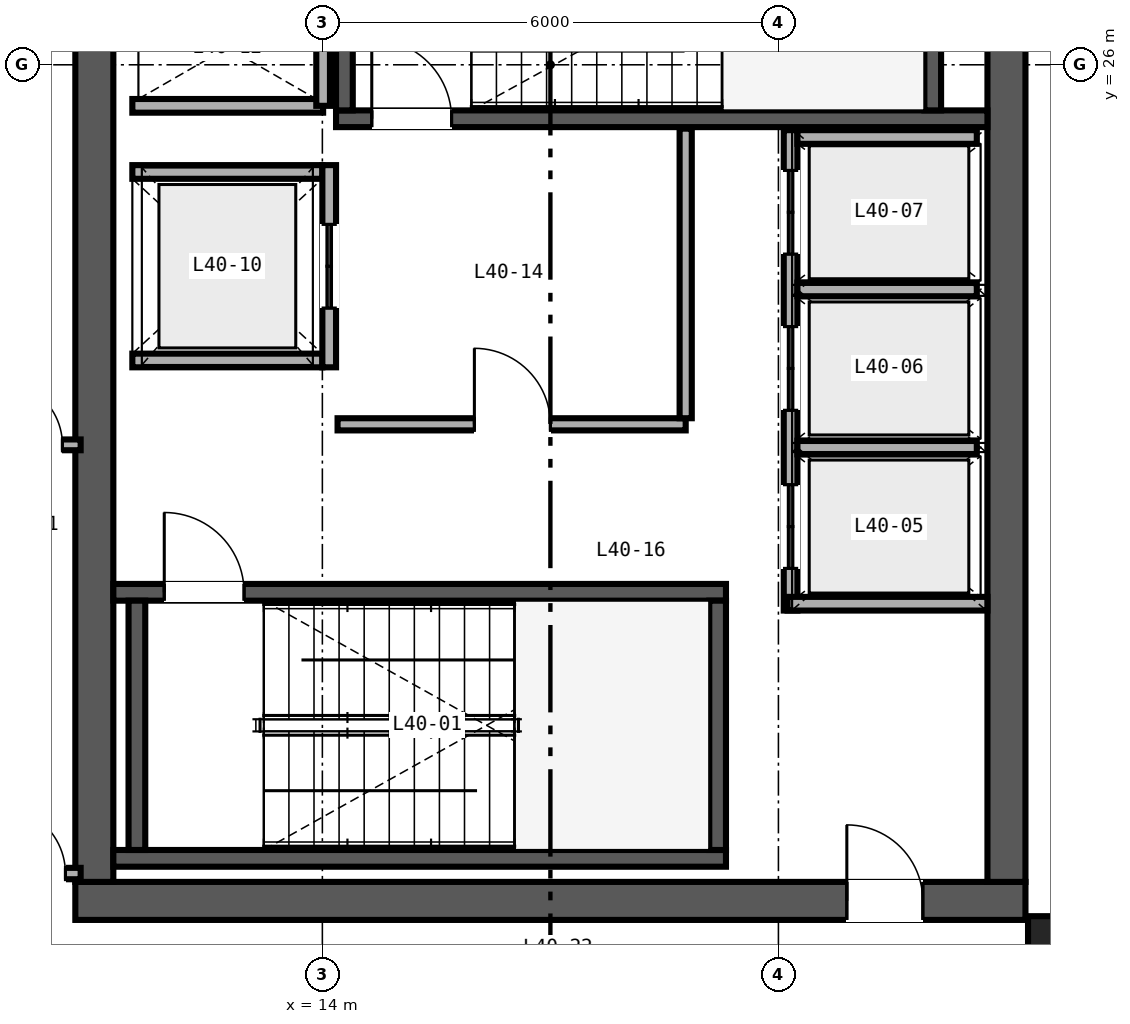
"""IFC4 building model, lengths in metres.
Left out: names, types, materials, properties, quantities, classifications, styles, units other than length and angle.
Written with IfcOpenShell. Run it as: python <this file> out.ifc"""

import sys

from ifc_helpers import new_model, si_unit, direction, frame, frame_2d, origin, origin_2d, place, context, subcontext, project, spatial, rectangle, i_section, extrude, source, transform, mapped, element, fill, save


model = new_model("IFC4")
c1 = context("Model", 3, precision=1e-05, world=origin(), true_north=direction((0.0, 1.0)))
c2 = subcontext(c1, "Body", "Model", "MODEL_VIEW")
j1 = project(units=[si_unit("LENGTHUNIT", "METRE"), si_unit("PLANEANGLEUNIT", "RADIAN")], contexts=[c1])
p1 = place(None, origin())
s1 = spatial("IfcSite", under=j1, at=p1, CompositionType="ELEMENT")
p2 = place(p1, origin())
s2 = spatial("IfcBuilding", under=s1, at=p2, CompositionType="ELEMENT")
p3 = place(p2, frame((0.0, 0.0, 163.2)))
s3 = spatial("IfcBuildingStorey", under=s2, at=p3, CompositionType="ELEMENT", Elevation=163.2)
p4 = place(p3, frame((10.75, 15.0, 0.0), z_axis=(0.0, 0.0, 1.0), x_axis=(1.0, 0.0, 0.0)))
e1 = element("IfcWall", 1, at=p4, inside=s3, PredefinedType="SHEAR", context=c2, shape_type="SweptSolid", body=[
    extrude(rectangle(XDim=12.5, YDim=0.5, at=frame_2d((6.25, 0.0))), origin(), (0.0, 0.0, 1.0), 3.37),
])
p5 = place(p4, frame((10.15, 0.0, 0.0)))
e2 = element("IfcOpeningElement", 2, at=p5, cuts=e1, PredefinedType="OPENING", context=c2, shape_type="SweptSolid", body=[
    extrude(rectangle(XDim=1.0, YDim=2.15, at=frame_2d((0.5, 1.075))), frame((0.0, 0.26, 0.0), z_axis=(0.0, -1.0, 0.0), x_axis=(1.0, 0.0, 0.0)), (0.0, 0.0, 1.0), 0.52),
])
for number, where, z_axis, x_axis in (
    (3, (11.0, 15.25, 0.0), (0.0, 0.0, 1.0), (0.0, 1.0, 0.0)),
    (4, (23.0, 15.25, 0.0), (0.0, 0.0, 1.0), (0.0, 1.0, 0.0)),
):
    element("IfcWall", number, at=place(p3, frame(where, z_axis=z_axis, x_axis=x_axis)), inside=s3, PredefinedType="SHEAR", context=c2, shape_type="SweptSolid", body=[
        extrude(rectangle(XDim=21.5, YDim=0.5, at=frame_2d((10.75, 0.0))), origin(), (0.0, 0.0, 1.0), 3.37),
    ])
p6 = place(p3, frame((11.25, 15.56, 0.0), z_axis=(0.0, 0.0, 1.0), x_axis=(1.0, 0.0, 0.0)))
e5 = element("IfcWall", 5, at=p6, inside=s3, PredefinedType="SHEAR", context=c2, shape_type="SweptSolid", body=[
    extrude(rectangle(XDim=8.06, YDim=0.22, at=frame_2d((4.03, 0.0))), origin(), (0.0, 0.0, 1.0), 3.4),
])
p7 = place(p3, frame((11.25, 19.06, 0.0), z_axis=(0.0, 0.0, 1.0), x_axis=(1.0, 0.0, 0.0)))
e6 = element("IfcWall", 6, at=p7, inside=s3, PredefinedType="SHEAR", context=c2, shape_type="SweptSolid", body=[
    extrude(rectangle(XDim=8.06, YDim=0.22, at=frame_2d((4.03, 0.0))), origin(), (0.0, 0.0, 1.0), 3.4),
])
p8 = place(p7, frame((0.67, 0.0, 0.0)))
e7 = element("IfcOpeningElement", 7, at=p8, cuts=e6, PredefinedType="OPENING", context=c2, shape_type="SweptSolid", body=[
    extrude(rectangle(XDim=1.05, YDim=2.15, at=frame_2d((0.525, 1.075))), frame((0.0, 0.12, 0.0), z_axis=(0.0, -1.0, 0.0), x_axis=(1.0, 0.0, 0.0)), (0.0, 0.0, 1.0), 0.24),
])
for number, where, z_axis, x_axis in (
    (8, (11.56, 15.67, 0.0), (0.0, 0.0, 1.0), (0.0, 1.0, 0.0)),
    (9, (19.2, 15.67, 0.0), (0.0, 0.0, 1.0), (0.0, 1.0, 0.0)),
):
    element("IfcWall", number, at=place(p3, frame(where, z_axis=z_axis, x_axis=x_axis)), inside=s3, PredefinedType="SHEAR", context=c2, shape_type="SweptSolid", body=[
        extrude(rectangle(XDim=3.28, YDim=0.22, at=frame_2d((1.64, 0.0))), origin(), (0.0, 0.0, 1.0), 3.4),
    ])
p9 = place(p3, frame((14.18, 25.29, 0.0), z_axis=(0.0, 0.0, 1.0), x_axis=(1.0, 0.0, 0.0)))
e10 = element("IfcWall", 10, at=p9, inside=s3, PredefinedType="SHEAR", context=c2, shape_type="SweptSolid", body=[
    extrude(rectangle(XDim=8.57, YDim=0.22, at=frame_2d((4.285, 0.0))), origin(), (0.0, 0.0, 1.0), 3.4),
])
p10 = place(p9, frame((0.47, 0.0, 0.0)))
e11 = element("IfcOpeningElement", 11, at=p10, cuts=e10, PredefinedType="OPENING", context=c2, shape_type="SweptSolid", body=[
    extrude(rectangle(XDim=1.05, YDim=2.15, at=frame_2d((0.525, 1.075))), frame((0.0, 0.12, 0.0), z_axis=(0.0, -1.0, 0.0), x_axis=(1.0, 0.0, 0.0)), (0.0, 0.0, 1.0), 0.24),
])
for number, where, z_axis, x_axis in (
    (12, (14.29, 25.4, 0.0), (0.0, 0.0, 1.0), (0.0, 1.0, 0.0)),
    (13, (22.03, 25.4, 0.0), (0.0, 0.0, 1.0), (0.0, 1.0, 0.0)),
):
    element("IfcWall", number, at=place(p3, frame(where, z_axis=z_axis, x_axis=x_axis)), inside=s3, PredefinedType="SHEAR", context=c2, shape_type="SweptSolid", body=[
        extrude(rectangle(XDim=3.28, YDim=0.22, at=frame_2d((1.64, 0.0))), origin(), (0.0, 0.0, 1.0), 3.4),
    ])
m1 = source(origin(), c2, "Body", "SweptSolid", [
    extrude(i_section(OverallWidth=0.432, OverallDepth=0.498, WebThickness=0.056, FlangeThickness=0.089, FilletRadius=0.025, at=origin_2d()), origin(), (0.0, 0.0, 1.0), 3.37),
])
p11 = place(p3, frame((23.5, 14.55, 0.0), z_axis=(0.0, 0.0, 1.0), x_axis=(1.0, 0.0, 0.0)))
e14 = element("IfcColumn", 14, at=p11, inside=s3, PredefinedType="COLUMN", context=c2, shape_type="MappedRepresentation", body=[
    mapped(m1, transform((0.0, 0.0, 0.0), scale=1.0)),
])
p12 = place(p3, frame((20.16, 18.82, 0.0), z_axis=(0.0, 0.0, 1.0), x_axis=(0.0, 1.0, 0.0)))
e15 = element("IfcWall", 15, at=p12, inside=s3, PredefinedType="SOLIDWALL", context=c2, shape_type="SweptSolid", body=[
    extrude(rectangle(XDim=6.32, YDim=0.18, at=frame_2d((3.16, 0.0))), origin(), (0.0, 0.0, 1.0), 2.47),
])
p13 = place(p12, frame((0.555, 0.0, 0.0)))
e16 = element("IfcOpeningElement", 16, at=p13, cuts=e15, PredefinedType="OPENING", context=c2, shape_type="SweptSolid", body=[
    extrude(rectangle(XDim=1.1, YDim=2.2, at=frame_2d((0.55, 1.1))), frame((0.0, 0.1, 0.0), z_axis=(0.0, -1.0, 0.0), x_axis=(1.0, 0.0, 0.0)), (0.0, 0.0, 1.0), 0.2),
])
p14 = place(p12, frame((2.635, 0.0, 0.0)))
e17 = element("IfcOpeningElement", 17, at=p14, cuts=e15, PredefinedType="OPENING", context=c2, shape_type="SweptSolid", body=[
    extrude(rectangle(XDim=1.1, YDim=2.2, at=frame_2d((0.55, 1.1))), frame((0.0, 0.1, 0.0), z_axis=(0.0, -1.0, 0.0), x_axis=(1.0, 0.0, 0.0)), (0.0, 0.0, 1.0), 0.2),
])
p15 = place(p12, frame((4.69, 0.0, 0.0)))
e18 = element("IfcOpeningElement", 18, at=p15, cuts=e15, PredefinedType="OPENING", context=c2, shape_type="SweptSolid", body=[
    extrude(rectangle(XDim=1.1, YDim=2.2, at=frame_2d((0.55, 1.1))), frame((0.0, 0.1, 0.0), z_axis=(0.0, -1.0, 0.0), x_axis=(1.0, 0.0, 0.0)), (0.0, 0.0, 1.0), 0.2),
])
p16 = place(p3, frame((20.12, 18.91, 0.0), z_axis=(0.0, 0.0, 1.0), x_axis=(1.0, 0.0, 0.0)))
e19 = element("IfcWall", 19, at=p16, inside=s3, PredefinedType="SOLIDWALL", context=c2, shape_type="SweptSolid", body=[
    extrude(rectangle(XDim=2.63, YDim=0.18, at=frame_2d((1.315, 0.0))), origin(), (0.0, 0.0, 1.0), 3.37),
])
p17 = place(p3, frame((20.25, 25.05, 0.0), z_axis=(0.0, 0.0, 1.0), x_axis=(1.0, 0.0, 0.0)))
e20 = element("IfcWall", 20, at=p17, inside=s3, PredefinedType="SOLIDWALL", context=c2, shape_type="SweptSolid", body=[
    extrude(rectangle(XDim=2.36, YDim=0.18, at=frame_2d((1.18, 0.0))), origin(), (0.0, 0.0, 1.0), 3.37),
])
p18 = place(p3, frame((20.25, 20.965, 0.0), z_axis=(0.0, 0.0, 1.0), x_axis=(1.0, 0.0, 0.0)))
e21 = element("IfcWall", 21, at=p18, inside=s3, PredefinedType="SOLIDWALL", context=c2, shape_type="SweptSolid", body=[
    extrude(rectangle(XDim=2.36, YDim=0.18, at=frame_2d((1.18, 0.0))), origin(), (0.0, 0.0, 1.0), 2.47),
])
p19 = place(p3, frame((20.25, 23.045, 0.0), z_axis=(0.0, 0.0, 1.0), x_axis=(1.0, 0.0, 0.0)))
e22 = element("IfcWall", 22, at=p19, inside=s3, PredefinedType="SOLIDWALL", context=c2, shape_type="SweptSolid", body=[
    extrude(rectangle(XDim=2.36, YDim=0.18, at=frame_2d((1.18, 0.0))), origin(), (0.0, 0.0, 1.0), 3.37),
])
for number, where, z_axis, x_axis in (
    (23, (11.5, 22.11, 0.0), (0.0, 0.0, 1.0), (1.0, 0.0, 0.0)),
    (24, (11.5, 24.59, 0.0), (0.0, 0.0, 1.0), (1.0, 0.0, 0.0)),
):
    element("IfcWall", number, at=place(p3, frame(where, z_axis=z_axis, x_axis=x_axis)), inside=s3, PredefinedType="SOLIDWALL", context=c2, shape_type="SweptSolid", body=[
        extrude(rectangle(XDim=2.5, YDim=0.18, at=frame_2d((1.25, 0.0))), origin(), (0.0, 0.0, 1.0), 3.37),
    ])
p20 = place(p3, frame((14.09, 22.02, 0.0), z_axis=(0.0, 0.0, 1.0), x_axis=(0.0, 1.0, 0.0)))
e25 = element("IfcWall", 25, at=p20, inside=s3, PredefinedType="SOLIDWALL", context=c2, shape_type="SweptSolid", body=[
    extrude(rectangle(XDim=2.66, YDim=0.18, at=frame_2d((1.33, 0.0))), origin(), (0.0, 0.0, 1.0), 3.37),
])
p21 = place(p20, frame((0.78, 0.0, 0.0)))
e26 = element("IfcOpeningElement", 26, at=p21, cuts=e25, PredefinedType="OPENING", context=c2, shape_type="SweptSolid", body=[
    extrude(rectangle(XDim=1.1, YDim=2.2, at=frame_2d((0.55, 1.1))), frame((0.0, 0.1, 0.0), z_axis=(0.0, -1.0, 0.0), x_axis=(1.0, 0.0, 0.0)), (0.0, 0.0, 1.0), 0.2),
])
p22 = place(p3, frame((11.5, 25.46, 0.0), z_axis=(0.0, 0.0, 1.0), x_axis=(1.0, 0.0, 0.0)))
e27 = element("IfcWall", 27, at=p22, inside=s3, PredefinedType="SOLIDWALL", context=c2, shape_type="SweptSolid", body=[
    extrude(rectangle(XDim=2.51, YDim=0.18, at=frame_2d((1.255, 0.0))), origin(), (0.0, 0.0, 1.0), 3.37),
])
p23 = place(p3, frame((14.01, 25.46, 0.0), z_axis=(0.0, 0.0, 1.0), x_axis=(0.0, 1.0, 0.0)))
e28 = element("IfcWall", 28, at=p23, inside=s3, PredefinedType="SOLIDWALL", context=c2, shape_type="SweptSolid", body=[
    extrude(rectangle(XDim=3.08, YDim=0.18, at=frame_2d((1.54, 0.0))), origin(), (0.0, 0.0, 1.0), 3.37),
])
p24 = place(p3, frame((14.2, 21.27, 0.0), z_axis=(0.0, 0.0, 1.0), x_axis=(1.0, 0.0, 0.0)))
e29 = element("IfcWall", 29, at=p24, inside=s3, PredefinedType="PARTITIONING", context=c2, shape_type="SweptSolid", body=[
    extrude(rectangle(XDim=4.58, YDim=0.16, at=frame_2d((2.29, 0.0))), origin(), (0.0, 0.0, 1.0), 3.37),
])
p25 = place(p24, frame((1.8, 0.0, 0.0)))
e30 = element("IfcOpeningElement", 30, at=p25, cuts=e29, PredefinedType="OPENING", context=c2, shape_type="SweptSolid", body=[
    extrude(rectangle(XDim=1.0, YDim=2.15, at=frame_2d((0.5, 1.075))), frame((0.0, 0.09, 0.0), z_axis=(0.0, -1.0, 0.0), x_axis=(1.0, 0.0, 0.0)), (0.0, 0.0, 1.0), 0.18),
])
p26 = place(p3, frame((18.78, 21.35, 0.0), z_axis=(0.0, 0.0, 1.0), x_axis=(0.0, 1.0, 0.0)))
e31 = element("IfcWall", 31, at=p26, inside=s3, PredefinedType="PARTITIONING", context=c2, shape_type="SweptSolid", body=[
    extrude(rectangle(XDim=3.81, YDim=0.16, at=frame_2d((1.905, 0.0))), origin(), (0.0, 0.0, 1.0), 3.37),
])
p27 = place(p3, frame((8.16, 15.36, 0.0), z_axis=(0.0, 0.0, 1.0), x_axis=(1.0, 0.0, 0.0)))
e32 = element("IfcWall", 32, at=p27, inside=s3, PredefinedType="PARTITIONING", context=c2, shape_type="SweptSolid", body=[
    extrude(rectangle(XDim=2.66, YDim=0.15, at=frame_2d((1.33, 0.0))), origin(), (0.0, 0.0, 1.0), 2.591),
])
p28 = place(p27, frame((1.58, 0.0, 0.0)))
e33 = element("IfcOpeningElement", 33, at=p28, cuts=e32, PredefinedType="OPENING", context=c2, shape_type="SweptSolid", body=[
    extrude(rectangle(XDim=0.88, YDim=2.15, at=frame_2d((0.44, 1.075))), frame((0.0, 0.085, 0.0), z_axis=(0.0, -1.0, 0.0), x_axis=(1.0, 0.0, 0.0)), (0.0, 0.0, 1.0), 0.17),
])
p29 = place(p3, frame((8.16, 21.0, 0.0), z_axis=(0.0, 0.0, 1.0), x_axis=(1.0, 0.0, 0.0)))
e34 = element("IfcWall", 34, at=p29, inside=s3, PredefinedType="PARTITIONING", context=c2, shape_type="SweptSolid", body=[
    extrude(rectangle(XDim=2.66, YDim=0.142, at=frame_2d((1.33, 0.0))), origin(), (0.0, 0.0, 1.0), 2.47),
])
p30 = place(p29, frame((1.58, 0.0, 0.0)))
e35 = element("IfcOpeningElement", 35, at=p30, cuts=e34, PredefinedType="OPENING", context=c2, shape_type="SweptSolid", body=[
    extrude(rectangle(XDim=0.84, YDim=2.1, at=frame_2d((0.42, 1.05))), frame((0.0, 0.081, 0.0), z_axis=(0.0, -1.0, 0.0), x_axis=(1.0, 0.0, 0.0)), (0.0, 0.0, 1.0), 0.162),
])
m2 = source(origin(), c2, "Body", "SweptSolid", [
    extrude(rectangle(XDim=1.05, YDim=2.15, at=frame_2d((0.525, 1.075))), frame((0.0, 0.025, 0.0), z_axis=(0.0, -1.0, 0.0), x_axis=(1.0, 0.0, 0.0)), (0.0, 0.0, 1.0), 0.05),
])
p31 = place(p8, origin())
e36 = element("IfcDoor", 36, at=p31, inside=s3, OperationType="SINGLE_SWING_LEFT", PredefinedType="DOOR", context=c2, shape_type="MappedRepresentation", body=[
    mapped(m2, transform((0.0, 0.0, 0.0), scale=1.0)),
])
fill(e7, e36)
p32 = place(p10, origin())
e37 = element("IfcDoor", 37, at=p32, inside=s3, OperationType="SINGLE_SWING_LEFT", PredefinedType="DOOR", context=c2, shape_type="MappedRepresentation", body=[
    mapped(m2, transform((0.0, 0.0, 0.0), scale=1.0)),
])
fill(e11, e37)
m3 = source(origin(), c2, "Body", "SweptSolid", [
    extrude(rectangle(XDim=1.1, YDim=2.2, at=frame_2d((0.55, 1.1))), frame((0.0, 0.025, 0.0), z_axis=(0.0, -1.0, 0.0), x_axis=(1.0, 0.0, 0.0)), (0.0, 0.0, 1.0), 0.05),
])
p33 = place(p13, origin())
e38 = element("IfcDoor", 38, at=p33, inside=s3, OperationType="DOUBLE_DOOR_SLIDING", PredefinedType="DOOR", context=c2, shape_type="MappedRepresentation", body=[
    mapped(m3, transform((0.0, 0.0, 0.0), scale=1.0)),
])
fill(e16, e38)
p34 = place(p14, origin())
e39 = element("IfcDoor", 39, at=p34, inside=s3, OperationType="DOUBLE_DOOR_SLIDING", PredefinedType="DOOR", context=c2, shape_type="MappedRepresentation", body=[
    mapped(m3, transform((0.0, 0.0, 0.0), scale=1.0)),
])
fill(e17, e39)
p35 = place(p15, origin())
e40 = element("IfcDoor", 40, at=p35, inside=s3, OperationType="DOUBLE_DOOR_SLIDING", PredefinedType="DOOR", context=c2, shape_type="MappedRepresentation", body=[
    mapped(m3, transform((0.0, 0.0, 0.0), scale=1.0)),
])
fill(e18, e40)
p36 = place(p21, origin())
e41 = element("IfcDoor", 41, at=p36, inside=s3, OperationType="DOUBLE_DOOR_SLIDING", PredefinedType="DOOR", context=c2, shape_type="MappedRepresentation", body=[
    mapped(m3, transform((0.0, 0.0, 0.0), scale=1.0)),
])
fill(e26, e41)
m4 = source(origin(), c2, "Body", "SweptSolid", [
    extrude(rectangle(XDim=1.0, YDim=2.15, at=frame_2d((0.5, 1.075))), frame((0.0, 0.025, 0.0), z_axis=(0.0, -1.0, 0.0), x_axis=(1.0, 0.0, 0.0)), (0.0, 0.0, 1.0), 0.05),
])
p37 = place(p25, origin())
e42 = element("IfcDoor", 42, at=p37, inside=s3, OperationType="SINGLE_SWING_LEFT", PredefinedType="DOOR", context=c2, shape_type="MappedRepresentation", body=[
    mapped(m4, transform((0.0, 0.0, 0.0), scale=1.0)),
])
fill(e30, e42)
p38 = place(p5, origin())
e43 = element("IfcDoor", 43, at=p38, inside=s3, OperationType="SINGLE_SWING_LEFT", PredefinedType="DOOR", context=c2, shape_type="MappedRepresentation", body=[
    mapped(m4, transform((0.0, 0.0, 0.0), scale=1.0)),
])
fill(e2, e43)
m5 = source(origin(), c2, "Body", "SweptSolid", [
    extrude(rectangle(XDim=0.88, YDim=2.15, at=frame_2d((0.44, 1.075))), frame((0.0, 0.025, 0.0), z_axis=(0.0, -1.0, 0.0), x_axis=(1.0, 0.0, 0.0)), (0.0, 0.0, 1.0), 0.05),
])
p39 = place(p28, origin())
e44 = element("IfcDoor", 44, at=p39, inside=s3, OperationType="SINGLE_SWING_LEFT", PredefinedType="DOOR", context=c2, shape_type="MappedRepresentation", body=[
    mapped(m5, transform((0.0, 0.0, 0.0), scale=1.0)),
])
fill(e33, e44)
m6 = source(origin(), c2, "Body", "SweptSolid", [
    extrude(rectangle(XDim=0.84, YDim=2.1, at=frame_2d((0.42, 1.05))), frame((0.0, 0.025, 0.0), z_axis=(0.0, -1.0, 0.0), x_axis=(1.0, 0.0, 0.0)), (0.0, 0.0, 1.0), 0.05),
])
p40 = place(p30, origin())
e45 = element("IfcDoor", 45, at=p40, inside=s3, OperationType="SINGLE_SWING_LEFT", PredefinedType="DOOR", context=c2, shape_type="MappedRepresentation", body=[
    mapped(m6, transform((0.0, 0.0, 0.0), scale=1.0)),
])
fill(e35, e45)
save(model, sys.argv[1])
